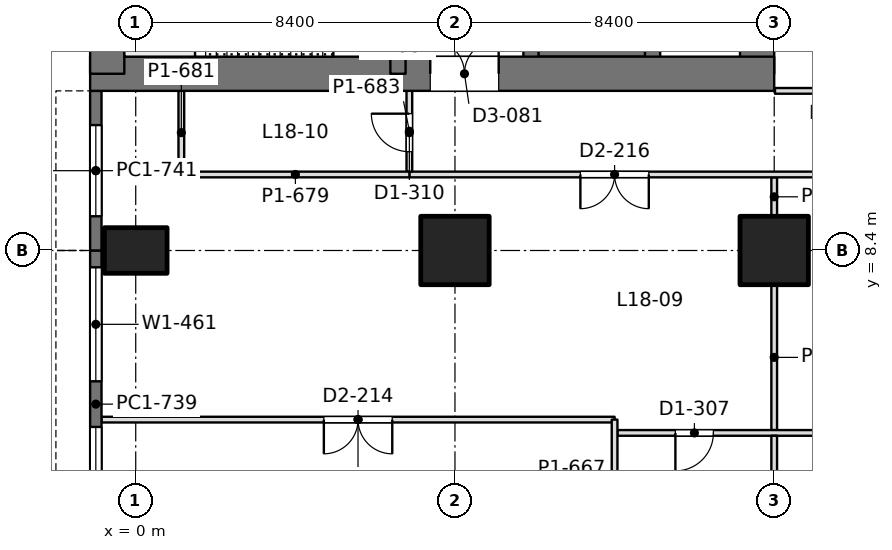
"""IFC4 building model, lengths in metres.
Left out: names, types, materials, properties, quantities, classifications, styles, units other than length and angle.
Written with IfcOpenShell. Run it as: python <this file> out.ifc"""

import sys

from ifc_helpers import new_model, si_unit, direction, frame, frame_2d, origin, origin_2d, place, context, subcontext, project, spatial, rectangle, extrude, element, fill, save


model = new_model("IFC4")
c1 = context("Model", 3, precision=1e-05, world=origin(), true_north=direction((0.0, 1.0)))
c2 = subcontext(c1, "Body", "Model", "MODEL_VIEW")
j1 = project(units=[si_unit("LENGTHUNIT", "METRE"), si_unit("PLANEANGLEUNIT", "RADIAN")], contexts=[c1])
p1 = place(None, origin())
s1 = spatial("IfcSite", under=j1, at=p1, CompositionType="ELEMENT")
p2 = place(p1, origin())
s2 = spatial("IfcBuilding", under=s1, at=p2, CompositionType="ELEMENT")
p3 = place(p2, frame((0.0, 0.0, 81.9)))
s3 = spatial("IfcBuildingStorey", under=s2, at=p3, CompositionType="ELEMENT", Elevation=81.9)
p4 = place(p3, frame((0.0, 8.4, 0.0), z_axis=(0.0, 0.0, 1.0), x_axis=(0.0, 1.0, 0.0)))
e1 = element("IfcColumn", 1, at=p4, inside=s3, PredefinedType="COLUMN", context=c2, shape_type="SweptSolid", body=[
    extrude(rectangle(XDim=1.2, YDim=1.65, at=origin_2d()), origin(), (0.0, 0.0, 1.0), 4.5),
])
for number, where, z_axis, x_axis in (
    (2, (8.4, 8.4, 0.0), (0.0, 0.0, 1.0), (1.0, 0.0, 0.0)),
    (3, (16.8, 8.4, 0.0), (0.0, 0.0, 1.0), (1.0, 0.0, 0.0)),
):
    element("IfcColumn", number, at=place(p3, frame(where, z_axis=z_axis, x_axis=x_axis)), inside=s3, PredefinedType="COLUMN", context=c2, shape_type="SweptSolid", body=[
        extrude(rectangle(XDim=1.8, YDim=1.8, at=origin_2d()), origin(), (0.0, 0.0, 1.0), 4.5),
    ])
p5 = place(p3, frame((-1.2, 13.05, 0.0), z_axis=(0.0, 0.0, 1.0), x_axis=(1.0, 0.0, 0.0)))
e4 = element("IfcWall", 4, at=p5, inside=s3, PredefinedType="SHEAR", context=c2, shape_type="SweptSolid", body=[
    extrude(rectangle(XDim=18.0, YDim=0.9, at=frame_2d((9.0, 0.0))), origin(), (0.0, 0.0, 1.0), 4.5),
])
p6 = place(p5, frame((8.95, 0.0, 0.0)))
e5 = element("IfcOpeningElement", 5, at=p6, cuts=e4, PredefinedType="OPENING", context=c2, shape_type="SweptSolid", body=[
    extrude(rectangle(XDim=1.8, YDim=2.4, at=frame_2d((0.9, 1.2))), frame((0.0, 0.46, 0.0), z_axis=(0.0, -1.0, 0.0), x_axis=(1.0, 0.0, 0.0)), (0.0, 0.0, 1.0), 0.92),
])
for number, where, z_axis, x_axis in (
    (6, (-0.75, 13.05, 0.0), (0.0, 0.0, 1.0), (0.0, 1.0, 0.0)),
    (7, (16.35, 13.05, 0.0), (0.0, 0.0, 1.0), (0.0, 1.0, 0.0)),
):
    element("IfcWall", number, at=place(p3, frame(where, z_axis=z_axis, x_axis=x_axis)), inside=s3, PredefinedType="SHEAR", context=c2, shape_type="SweptSolid", body=[
        extrude(rectangle(XDim=24.3, YDim=0.9, at=frame_2d((12.15, 0.0))), origin(), (0.0, 0.0, 1.0), 4.5),
    ])
p7 = place(p3, frame((6.9, 13.05, 0.0), z_axis=(0.0, 0.0, 1.0), x_axis=(0.0, 1.0, 0.0)))
e8 = element("IfcWall", 8, at=p7, inside=s3, PredefinedType="SHEAR", context=c2, shape_type="SweptSolid", body=[
    extrude(rectangle(XDim=24.3, YDim=0.4, at=frame_2d((12.15, 0.0))), origin(), (0.0, 0.0, 1.0), 4.5),
])
p8 = place(p7, frame((1.3, 0.0, 0.0)))
e9 = element("IfcOpeningElement", 9, at=p8, cuts=e8, PredefinedType="OPENING", context=c2, shape_type="SweptSolid", body=[
    extrude(rectangle(XDim=1.0, YDim=2.2, at=frame_2d((0.5, 1.1))), frame((0.0, 0.21, 0.0), z_axis=(0.0, -1.0, 0.0), x_axis=(1.0, 0.0, 0.0)), (0.0, 0.0, 1.0), 0.42),
])
p9 = place(p7, frame((22.0, 0.0, 0.0)))
e10 = element("IfcOpeningElement", 10, at=p9, cuts=e8, PredefinedType="OPENING", context=c2, shape_type="SweptSolid", body=[
    extrude(rectangle(XDim=1.0, YDim=2.2, at=frame_2d((0.5, 1.1))), frame((0.0, 0.21, 0.0), z_axis=(0.0, -1.0, 0.0), x_axis=(1.0, 0.0, 0.0)), (0.0, 0.0, 1.0), 0.42),
])
p10 = place(p7, frame((5.55, 0.0, 0.0)))
e11 = element("IfcOpeningElement", 11, at=p10, cuts=e8, PredefinedType="OPENING", context=c2, shape_type="SweptSolid", body=[
    extrude(rectangle(XDim=1.0, YDim=2.2, at=frame_2d((0.5, 1.1))), frame((0.0, 0.21, 0.0), z_axis=(0.0, -1.0, 0.0), x_axis=(1.0, 0.0, 0.0)), (0.0, 0.0, 1.0), 0.42),
])
p11 = place(p7, frame((9.55, 0.0, 0.0)))
e12 = element("IfcOpeningElement", 12, at=p11, cuts=e8, PredefinedType="OPENING", context=c2, shape_type="SweptSolid", body=[
    extrude(rectangle(XDim=1.0, YDim=2.2, at=frame_2d((0.5, 1.1))), frame((0.0, 0.21, 0.0), z_axis=(0.0, -1.0, 0.0), x_axis=(1.0, 0.0, 0.0)), (0.0, 0.0, 1.0), 0.42),
])
p12 = place(p7, frame((12.8, 0.0, 0.0)))
e13 = element("IfcOpeningElement", 13, at=p12, cuts=e8, PredefinedType="OPENING", context=c2, shape_type="SweptSolid", body=[
    extrude(rectangle(XDim=1.1, YDim=2.2, at=frame_2d((0.55, 1.1))), frame((0.0, 0.21, 0.0), z_axis=(0.0, -1.0, 0.0), x_axis=(1.0, 0.0, 0.0)), (0.0, 0.0, 1.0), 0.42),
])
p13 = place(p7, frame((15.538, 0.0, 0.0)))
e14 = element("IfcOpeningElement", 14, at=p13, cuts=e8, PredefinedType="OPENING", context=c2, shape_type="SweptSolid", body=[
    extrude(rectangle(XDim=1.1, YDim=2.2, at=frame_2d((0.55, 1.1))), frame((0.0, 0.21, 0.0), z_axis=(0.0, -1.0, 0.0), x_axis=(1.0, 0.0, 0.0)), (0.0, 0.0, 1.0), 0.42),
])
p14 = place(p7, frame((18.262, 0.0, 0.0)))
e15 = element("IfcOpeningElement", 15, at=p14, cuts=e8, PredefinedType="OPENING", context=c2, shape_type="SweptSolid", body=[
    extrude(rectangle(XDim=1.1, YDim=2.2, at=frame_2d((0.55, 1.1))), frame((0.0, 0.21, 0.0), z_axis=(0.0, -1.0, 0.0), x_axis=(1.0, 0.0, 0.0)), (0.0, 0.0, 1.0), 0.42),
])
p15 = place(p3, frame((10.4, 13.05, 0.0), z_axis=(0.0, 0.0, 1.0), x_axis=(0.0, 1.0, 0.0)))
e16 = element("IfcWall", 16, at=p15, inside=s3, PredefinedType="SHEAR", context=c2, shape_type="SweptSolid", body=[
    extrude(rectangle(XDim=24.3, YDim=0.4, at=frame_2d((12.15, 0.0))), origin(), (0.0, 0.0, 1.0), 4.5),
])
p16 = place(p15, frame((1.5, 0.0, 0.0)))
e17 = element("IfcOpeningElement", 17, at=p16, cuts=e16, PredefinedType="OPENING", context=c2, shape_type="SweptSolid", body=[
    extrude(rectangle(XDim=1.1, YDim=2.2, at=frame_2d((0.55, 1.1))), frame((0.0, 0.21, 0.0), z_axis=(0.0, -1.0, 0.0), x_axis=(1.0, 0.0, 0.0)), (0.0, 0.0, 1.0), 0.42),
])
p17 = place(p15, frame((4.35, 0.0, 0.0)))
e18 = element("IfcOpeningElement", 18, at=p17, cuts=e16, PredefinedType="OPENING", context=c2, shape_type="SweptSolid", body=[
    extrude(rectangle(XDim=1.1, YDim=2.2, at=frame_2d((0.55, 1.1))), frame((0.0, 0.21, 0.0), z_axis=(0.0, -1.0, 0.0), x_axis=(1.0, 0.0, 0.0)), (0.0, 0.0, 1.0), 0.42),
])
p18 = place(p15, frame((7.2, 0.0, 0.0)))
e19 = element("IfcOpeningElement", 19, at=p18, cuts=e16, PredefinedType="OPENING", context=c2, shape_type="SweptSolid", body=[
    extrude(rectangle(XDim=1.1, YDim=2.2, at=frame_2d((0.55, 1.1))), frame((0.0, 0.21, 0.0), z_axis=(0.0, -1.0, 0.0), x_axis=(1.0, 0.0, 0.0)), (0.0, 0.0, 1.0), 0.42),
])
p19 = place(p15, frame((21.45, 0.0, 0.0)))
e20 = element("IfcOpeningElement", 20, at=p19, cuts=e16, PredefinedType="OPENING", context=c2, shape_type="SweptSolid", body=[
    extrude(rectangle(XDim=1.1, YDim=2.2, at=frame_2d((0.55, 1.1))), frame((0.0, 0.21, 0.0), z_axis=(0.0, -1.0, 0.0), x_axis=(1.0, 0.0, 0.0)), (0.0, 0.0, 1.0), 0.42),
])
p20 = place(p3, frame((13.6, 13.05, 0.0), z_axis=(0.0, 0.0, 1.0), x_axis=(0.0, 1.0, 0.0)))
e21 = element("IfcWall", 21, at=p20, inside=s3, PredefinedType="SHEAR", context=c2, shape_type="SweptSolid", body=[
    extrude(rectangle(XDim=24.3, YDim=0.4, at=frame_2d((12.15, 0.0))), origin(), (0.0, 0.0, 1.0), 4.5),
])
p21 = place(p3, frame((10.4, 13.65, 0.0), z_axis=(0.0, 0.0, 1.0), x_axis=(1.0, 0.0, 0.0)))
e22 = element("IfcWall", 22, at=p21, inside=s3, PredefinedType="SHEAR", context=c2, shape_type="SweptSolid", body=[
    extrude(rectangle(XDim=3.2, YDim=0.3, at=frame_2d((1.6, 0.0))), origin(), (0.0, 0.0, 1.0), 4.5),
])
p22 = place(p3, frame((-1.05, 0.315, 0.0), z_axis=(0.0, 0.0, 1.0), x_axis=(0.0, 1.0, 0.0)))
e23 = element("IfcWall", 23, at=p22, inside=s3, PredefinedType="SOLIDWALL", context=c2, shape_type="SweptSolid", body=[
    extrude(rectangle(XDim=8.085, YDim=0.3, at=frame_2d((4.042, 0.0))), origin(), (0.0, 0.0, 1.0), 4.34),
])
p23 = place(p22, frame((0.443, 0.0, 0.9)))
e24 = element("IfcOpeningElement", 24, at=p23, cuts=e23, PredefinedType="OPENING", context=c2, shape_type="SweptSolid", body=[
    extrude(rectangle(XDim=3.0, YDim=1.9, at=frame_2d((1.5, 0.95))), frame((0.0, 0.16, 0.0), z_axis=(0.0, -1.0, 0.0), x_axis=(1.0, 0.0, 0.0)), (0.0, 0.0, 1.0), 0.32),
])
p24 = place(p22, frame((4.643, 0.0, 0.9)))
e25 = element("IfcOpeningElement", 25, at=p24, cuts=e23, PredefinedType="OPENING", context=c2, shape_type="SweptSolid", body=[
    extrude(rectangle(XDim=3.0, YDim=1.9, at=frame_2d((1.5, 0.95))), frame((0.0, 0.16, 0.0), z_axis=(0.0, -1.0, 0.0), x_axis=(1.0, 0.0, 0.0)), (0.0, 0.0, 1.0), 0.32),
])
p25 = place(p3, frame((-1.05, 8.4, 0.0), z_axis=(0.0, 0.0, 1.0), x_axis=(0.0, 1.0, 0.0)))
e26 = element("IfcWall", 26, at=p25, inside=s3, PredefinedType="SOLIDWALL", context=c2, shape_type="SweptSolid", body=[
    extrude(rectangle(XDim=4.2, YDim=0.3, at=frame_2d((2.1, 0.0))), origin(), (0.0, 0.0, 1.0), 4.34),
])
p26 = place(p25, frame((0.9, 0.0, 0.9)))
e27 = element("IfcOpeningElement", 27, at=p26, cuts=e26, PredefinedType="OPENING", context=c2, shape_type="SweptSolid", body=[
    extrude(rectangle(XDim=2.4, YDim=1.9, at=frame_2d((1.2, 0.95))), frame((0.0, 0.16, 0.0), z_axis=(0.0, -1.0, 0.0), x_axis=(1.0, 0.0, 0.0)), (0.0, 0.0, 1.0), 0.32),
])
p27 = place(p3, frame((-0.902, 3.95, 0.0), z_axis=(0.0, 0.0, 1.0), x_axis=(1.0, 0.0, 0.0)))
e28 = element("IfcWall", 28, at=p27, inside=s3, PredefinedType="PARTITIONING", context=c2, shape_type="SweptSolid", body=[
    extrude(rectangle(XDim=13.502, YDim=0.15, at=frame_2d((6.751, 0.0))), origin(), (0.0, 0.0, 1.0), 3.74),
])
p28 = place(p27, frame((5.852, 0.0, 0.0)))
e29 = element("IfcOpeningElement", 29, at=p28, cuts=e28, PredefinedType="OPENING", context=c2, shape_type="SweptSolid", body=[
    extrude(rectangle(XDim=1.8, YDim=2.2, at=frame_2d((0.9, 1.1))), frame((0.0, 0.085, 0.0), z_axis=(0.0, -1.0, 0.0), x_axis=(1.0, 0.0, 0.0)), (0.0, 0.0, 1.0), 0.17),
])
p29 = place(p3, frame((12.674, 3.6, 0.0), z_axis=(0.0, 0.0, 1.0), x_axis=(1.0, 0.0, 0.0)))
e30 = element("IfcWall", 30, at=p29, inside=s3, PredefinedType="PARTITIONING", context=c2, shape_type="SweptSolid", body=[
    extrude(rectangle(XDim=12.526, YDim=0.15, at=frame_2d((6.263, 0.0))), origin(), (0.0, 0.0, 1.0), 3.74),
])
p30 = place(p29, frame((1.526, 0.0, 0.0)))
e31 = element("IfcOpeningElement", 31, at=p30, cuts=e30, PredefinedType="OPENING", context=c2, shape_type="SweptSolid", body=[
    extrude(rectangle(XDim=1.0, YDim=2.2, at=frame_2d((0.5, 1.1))), frame((0.0, 0.085, 0.0), z_axis=(0.0, -1.0, 0.0), x_axis=(1.0, 0.0, 0.0)), (0.0, 0.0, 1.0), 0.17),
])
p31 = place(p29, frame((5.726, 0.0, 0.0)))
e32 = element("IfcOpeningElement", 32, at=p31, cuts=e30, PredefinedType="OPENING", context=c2, shape_type="SweptSolid", body=[
    extrude(rectangle(XDim=1.0, YDim=2.2, at=frame_2d((0.5, 1.1))), frame((0.0, 0.085, 0.0), z_axis=(0.0, -1.0, 0.0), x_axis=(1.0, 0.0, 0.0)), (0.0, 0.0, 1.0), 0.17),
])
p32 = place(p29, frame((9.926, 0.0, 0.0)))
e33 = element("IfcOpeningElement", 33, at=p32, cuts=e30, PredefinedType="OPENING", context=c2, shape_type="SweptSolid", body=[
    extrude(rectangle(XDim=1.0, YDim=2.2, at=frame_2d((0.5, 1.1))), frame((0.0, 0.085, 0.0), z_axis=(0.0, -1.0, 0.0), x_axis=(1.0, 0.0, 0.0)), (0.0, 0.0, 1.0), 0.17),
])
p33 = place(p3, frame((12.6, -0.902, 0.0), z_axis=(0.0, 0.0, 1.0), x_axis=(0.0, 1.0, 0.0)))
e34 = element("IfcWall", 34, at=p33, inside=s3, PredefinedType="PARTITIONING", context=c2, shape_type="SweptSolid", body=[
    extrude(rectangle(XDim=4.852, YDim=0.15, at=frame_2d((2.426, 0.0))), origin(), (0.0, 0.0, 1.0), 3.84),
])
p34 = place(p3, frame((16.8, 0.799, 0.0), z_axis=(0.0, 0.0, 1.0), x_axis=(0.0, 1.0, 0.0)))
e35 = element("IfcWall", 35, at=p34, inside=s3, PredefinedType="PARTITIONING", context=c2, shape_type="SweptSolid", body=[
    extrude(rectangle(XDim=2.727, YDim=0.15, at=frame_2d((1.363, 0.0))), origin(), (0.0, 0.0, 1.0), 3.74),
])
p35 = place(p3, frame((16.8, 3.674, 0.0), z_axis=(0.0, 0.0, 1.0), x_axis=(0.0, 1.0, 0.0)))
e36 = element("IfcWall", 36, at=p35, inside=s3, PredefinedType="PARTITIONING", context=c2, shape_type="SweptSolid", body=[
    extrude(rectangle(XDim=3.827, YDim=0.15, at=frame_2d((1.914, 0.0))), origin(), (0.0, 0.0, 1.0), 3.74),
])
p36 = place(p3, frame((16.8, 9.299, 0.0), z_axis=(0.0, 0.0, 1.0), x_axis=(0.0, 1.0, 0.0)))
e37 = element("IfcWall", 37, at=p36, inside=s3, PredefinedType="PARTITIONING", context=c2, shape_type="SweptSolid", body=[
    extrude(rectangle(XDim=1.027, YDim=0.15, at=frame_2d((0.513, 0.0))), origin(), (0.0, 0.0, 1.0), 3.98),
])
p37 = place(p3, frame((7.198, 10.4, 0.0), z_axis=(0.0, 0.0, 1.0), x_axis=(1.0, 0.0, 0.0)))
e38 = element("IfcWall", 38, at=p37, inside=s3, PredefinedType="PARTITIONING", context=c2, shape_type="SweptSolid", body=[
    extrude(rectangle(XDim=42.002, YDim=0.15, at=frame_2d((21.001, 0.0))), origin(), (0.0, 0.0, 1.0), 3.74),
])
p38 = place(p37, frame((4.502, 0.0, 0.0)))
e39 = element("IfcOpeningElement", 39, at=p38, cuts=e38, PredefinedType="OPENING", context=c2, shape_type="SweptSolid", body=[
    extrude(rectangle(XDim=1.8, YDim=2.2, at=frame_2d((0.9, 1.1))), frame((0.0, 0.085, 0.0), z_axis=(0.0, -1.0, 0.0), x_axis=(1.0, 0.0, 0.0)), (0.0, 0.0, 1.0), 0.17),
])
p39 = place(p37, frame((12.902, 0.0, 0.0)))
e40 = element("IfcOpeningElement", 40, at=p39, cuts=e38, PredefinedType="OPENING", context=c2, shape_type="SweptSolid", body=[
    extrude(rectangle(XDim=1.8, YDim=2.2, at=frame_2d((0.9, 1.1))), frame((0.0, 0.085, 0.0), z_axis=(0.0, -1.0, 0.0), x_axis=(1.0, 0.0, 0.0)), (0.0, 0.0, 1.0), 0.17),
])
p40 = place(p37, frame((21.302, 0.0, 0.0)))
e41 = element("IfcOpeningElement", 41, at=p40, cuts=e38, PredefinedType="OPENING", context=c2, shape_type="SweptSolid", body=[
    extrude(rectangle(XDim=1.8, YDim=2.2, at=frame_2d((0.9, 1.1))), frame((0.0, 0.085, 0.0), z_axis=(0.0, -1.0, 0.0), x_axis=(1.0, 0.0, 0.0)), (0.0, 0.0, 1.0), 0.17),
])
p41 = place(p37, frame((29.702, 0.0, 0.0)))
e42 = element("IfcOpeningElement", 42, at=p41, cuts=e38, PredefinedType="OPENING", context=c2, shape_type="SweptSolid", body=[
    extrude(rectangle(XDim=1.8, YDim=2.2, at=frame_2d((0.9, 1.1))), frame((0.0, 0.085, 0.0), z_axis=(0.0, -1.0, 0.0), x_axis=(1.0, 0.0, 0.0)), (0.0, 0.0, 1.0), 0.17),
])
p42 = place(p37, frame((38.102, 0.0, 0.0)))
e43 = element("IfcOpeningElement", 43, at=p42, cuts=e38, PredefinedType="OPENING", context=c2, shape_type="SweptSolid", body=[
    extrude(rectangle(XDim=1.8, YDim=2.2, at=frame_2d((0.9, 1.1))), frame((0.0, 0.085, 0.0), z_axis=(0.0, -1.0, 0.0), x_axis=(1.0, 0.0, 0.0)), (0.0, 0.0, 1.0), 0.17),
])
p43 = place(p3, frame((7.2, 10.474, 0.0), z_axis=(0.0, 0.0, 1.0), x_axis=(0.0, 1.0, 0.0)))
e44 = element("IfcWall", 44, at=p43, inside=s3, PredefinedType="PARTITIONING", context=c2, shape_type="SweptSolid", body=[
    extrude(rectangle(XDim=2.128, YDim=0.15, at=frame_2d((1.064, 0.0))), origin(), (0.0, 0.0, 1.0), 4.34),
])
p44 = place(p43, frame((0.526, 0.0, 0.0)))
e45 = element("IfcOpeningElement", 45, at=p44, cuts=e44, PredefinedType="OPENING", context=c2, shape_type="SweptSolid", body=[
    extrude(rectangle(XDim=1.0, YDim=2.2, at=frame_2d((0.5, 1.1))), frame((0.0, 0.085, 0.0), z_axis=(0.0, -1.0, 0.0), x_axis=(1.0, 0.0, 0.0)), (0.0, 0.0, 1.0), 0.17),
])
p45 = place(p3, frame((1.2, 10.4, 0.0), z_axis=(0.0, 0.0, 1.0), x_axis=(1.0, 0.0, 0.0)))
e46 = element("IfcWall", 46, at=p45, inside=s3, PredefinedType="PARTITIONING", context=c2, shape_type="SweptSolid", body=[
    extrude(rectangle(XDim=6.002, YDim=0.15, at=frame_2d((3.001, 0.0))), origin(), (0.0, 0.0, 1.0), 4.34),
])
p46 = place(p3, frame((1.2, 10.4, 0.0), z_axis=(0.0, 0.0, 1.0), x_axis=(0.0, 1.0, 0.0)))
e47 = element("IfcWall", 47, at=p46, inside=s3, PredefinedType="PARTITIONING", context=c2, shape_type="SweptSolid", body=[
    extrude(rectangle(XDim=2.202, YDim=0.15, at=frame_2d((1.101, 0.0))), origin(), (0.0, 0.0, 1.0), 4.34),
])
p47 = place(p3, frame((16.82, 12.6, 0.0), z_axis=(0.0, 0.0, 1.0), x_axis=(1.0, 0.0, 0.0)))
e48 = element("IfcWall", 48, at=p47, inside=s3, PredefinedType="PARTITIONING", context=c2, shape_type="SweptSolid", body=[
    extrude(rectangle(XDim=16.76, YDim=0.15, at=frame_2d((8.38, 0.0))), origin(), (0.0, 0.0, 1.0), 3.74),
])
p48 = place(p47, frame((1.33, 0.0, 0.0)))
e49 = element("IfcOpeningElement", 49, at=p48, cuts=e48, PredefinedType="OPENING", context=c2, shape_type="SweptSolid", body=[
    extrude(rectangle(XDim=1.0, YDim=2.2, at=frame_2d((0.5, 1.1))), frame((0.0, 0.085, 0.0), z_axis=(0.0, -1.0, 0.0), x_axis=(1.0, 0.0, 0.0)), (0.0, 0.0, 1.0), 0.17),
])
p49 = place(p47, frame((7.83, 0.0, 0.0)))
e50 = element("IfcOpeningElement", 50, at=p49, cuts=e48, PredefinedType="OPENING", context=c2, shape_type="SweptSolid", body=[
    extrude(rectangle(XDim=1.0, YDim=2.2, at=frame_2d((0.5, 1.1))), frame((0.0, 0.085, 0.0), z_axis=(0.0, -1.0, 0.0), x_axis=(1.0, 0.0, 0.0)), (0.0, 0.0, 1.0), 0.17),
])
p50 = place(p47, frame((14.38, 0.0, 0.0)))
e51 = element("IfcOpeningElement", 51, at=p50, cuts=e48, PredefinedType="OPENING", context=c2, shape_type="SweptSolid", body=[
    extrude(rectangle(XDim=1.0, YDim=2.2, at=frame_2d((0.5, 1.1))), frame((0.0, 0.085, 0.0), z_axis=(0.0, -1.0, 0.0), x_axis=(1.0, 0.0, 0.0)), (0.0, 0.0, 1.0), 0.17),
])
p51 = place(p23, origin())
e52 = element("IfcWindow", 52, at=p51, inside=s3, PartitioningType="SINGLE_PANEL", PredefinedType="WINDOW", context=c2, shape_type="SweptSolid", body=[
    extrude(rectangle(XDim=3.0, YDim=1.9, at=frame_2d((1.5, 0.95))), frame((0.0, 0.03, 0.0), z_axis=(0.0, -1.0, 0.0), x_axis=(1.0, 0.0, 0.0)), (0.0, 0.0, 1.0), 0.06),
])
fill(e24, e52)
p52 = place(p24, origin())
e53 = element("IfcWindow", 53, at=p52, inside=s3, PartitioningType="SINGLE_PANEL", PredefinedType="WINDOW", context=c2, shape_type="SweptSolid", body=[
    extrude(rectangle(XDim=3.0, YDim=1.9, at=frame_2d((1.5, 0.95))), frame((0.0, 0.03, 0.0), z_axis=(0.0, -1.0, 0.0), x_axis=(1.0, 0.0, 0.0)), (0.0, 0.0, 1.0), 0.06),
])
fill(e25, e53)
p53 = place(p26, origin())
e54 = element("IfcWindow", 54, at=p53, inside=s3, PartitioningType="SINGLE_PANEL", PredefinedType="WINDOW", context=c2, shape_type="SweptSolid", body=[
    extrude(rectangle(XDim=2.4, YDim=1.9, at=frame_2d((1.2, 0.95))), frame((0.0, 0.03, 0.0), z_axis=(0.0, -1.0, 0.0), x_axis=(1.0, 0.0, 0.0)), (0.0, 0.0, 1.0), 0.06),
])
fill(e27, e54)
p54 = place(p6, origin())
e55 = element("IfcDoor", 55, at=p54, inside=s3, OperationType="DOUBLE_DOOR_SINGLE_SWING", PredefinedType="DOOR", context=c2, shape_type="SweptSolid", body=[
    extrude(rectangle(XDim=1.8, YDim=2.4, at=frame_2d((0.9, 1.2))), frame((0.0, 0.025, 0.0), z_axis=(0.0, -1.0, 0.0), x_axis=(1.0, 0.0, 0.0)), (0.0, 0.0, 1.0), 0.05),
])
fill(e5, e55)
p55 = place(p28, frame((1.8, 0.0, 0.0), z_axis=(0.0, 0.0, 1.0), x_axis=(-1.0, 0.0, 0.0)))
e56 = element("IfcDoor", 56, at=p55, inside=s3, OperationType="DOUBLE_DOOR_SINGLE_SWING", PredefinedType="DOOR", context=c2, shape_type="SweptSolid", body=[
    extrude(rectangle(XDim=1.8, YDim=2.2, at=frame_2d((0.9, 1.1))), frame((0.0, 0.025, 0.0), z_axis=(0.0, -1.0, 0.0), x_axis=(1.0, 0.0, 0.0)), (0.0, 0.0, 1.0), 0.05),
])
fill(e29, e56)
p56 = place(p30, frame((1.0, 0.0, 0.0), z_axis=(0.0, 0.0, 1.0), x_axis=(-1.0, 0.0, 0.0)))
e57 = element("IfcDoor", 57, at=p56, inside=s3, OperationType="SINGLE_SWING_RIGHT", PredefinedType="DOOR", context=c2, shape_type="SweptSolid", body=[
    extrude(rectangle(XDim=1.0, YDim=2.2, at=frame_2d((0.5, 1.1))), frame((0.0, 0.025, 0.0), z_axis=(0.0, -1.0, 0.0), x_axis=(1.0, 0.0, 0.0)), (0.0, 0.0, 1.0), 0.05),
])
fill(e31, e57)
p57 = place(p38, frame((1.8, 0.0, 0.0), z_axis=(0.0, 0.0, 1.0), x_axis=(-1.0, 0.0, 0.0)))
e58 = element("IfcDoor", 58, at=p57, inside=s3, OperationType="DOUBLE_DOOR_SINGLE_SWING", PredefinedType="DOOR", context=c2, shape_type="SweptSolid", body=[
    extrude(rectangle(XDim=1.8, YDim=2.2, at=frame_2d((0.9, 1.1))), frame((0.0, 0.025, 0.0), z_axis=(0.0, -1.0, 0.0), x_axis=(1.0, 0.0, 0.0)), (0.0, 0.0, 1.0), 0.05),
])
fill(e39, e58)
p58 = place(p44, origin())
e59 = element("IfcDoor", 59, at=p58, inside=s3, OperationType="SINGLE_SWING_RIGHT", PredefinedType="DOOR", context=c2, shape_type="SweptSolid", body=[
    extrude(rectangle(XDim=1.0, YDim=2.2, at=frame_2d((0.5, 1.1))), frame((0.0, 0.025, 0.0), z_axis=(0.0, -1.0, 0.0), x_axis=(1.0, 0.0, 0.0)), (0.0, 0.0, 1.0), 0.05),
])
fill(e45, e59)
save(model, sys.argv[1])
